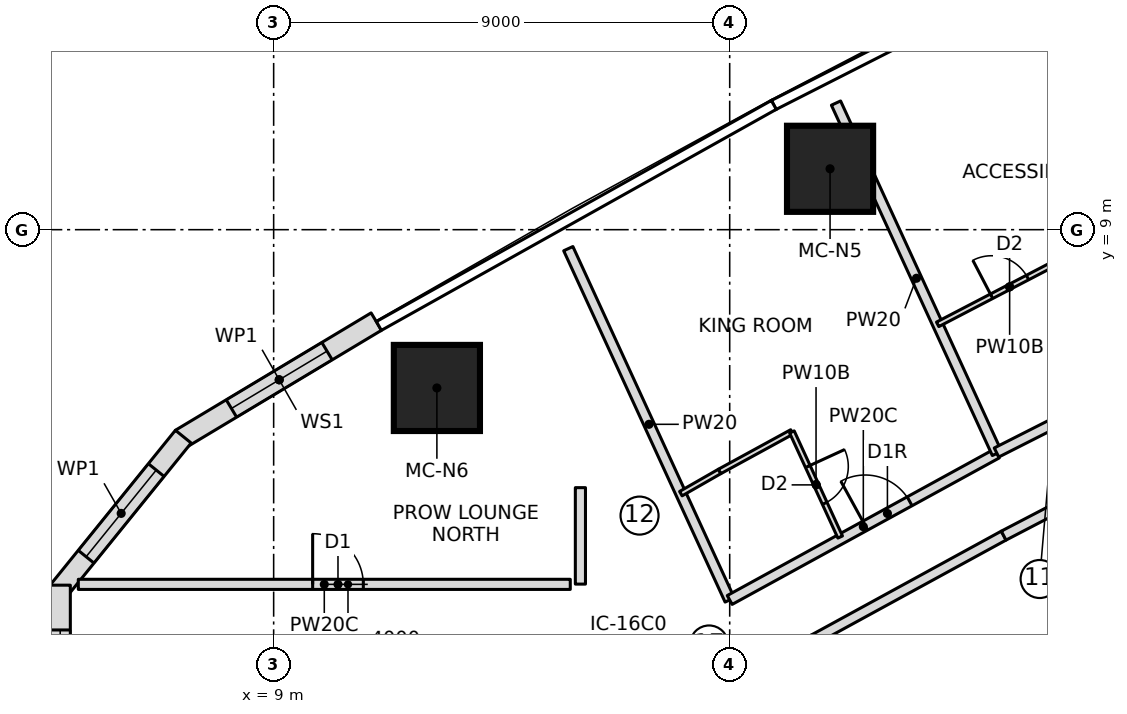
"""IFC4 building model, lengths in metres.
Left out: names, types, materials, properties, quantities, classifications, styles, units other than length and angle.
Written with IfcOpenShell. Run it as: python <this file> out.ifc"""

import sys

from ifc_helpers import new_model, si_unit, direction, frame, frame_2d, origin, origin_2d, place, context, subcontext, project, spatial, polyline, rectangle, outline, extrude, element, fill, save


model = new_model("IFC4")
c1 = context("Model", 3, precision=1e-05, world=origin(), true_north=direction((0.0, 1.0)))
c2 = subcontext(c1, "Body", "Model", "MODEL_VIEW")
j1 = project(units=[si_unit("LENGTHUNIT", "METRE"), si_unit("PLANEANGLEUNIT", "RADIAN")], contexts=[c1])
p1 = place(None, origin())
s1 = spatial("IfcSite", under=j1, at=p1, CompositionType="ELEMENT")
p2 = place(p1, origin())
s2 = spatial("IfcBuilding", under=s1, at=p2, CompositionType="ELEMENT")
p3 = place(p2, frame((0.0, 0.0, 109.75)))
s3 = spatial("IfcBuildingStorey", under=s2, at=p3, CompositionType="ELEMENT", Elevation=109.75)
for number, where, z_axis, x_axis in (
    (1, (19.981, 10.202, 0.0), (0.0, 0.0, 1.0), (1.0, 0.0, 0.0)),
    (2, (12.221, 5.876, 0.0), (0.0, 0.0, 1.0), (1.0, 0.0, 0.0)),
):
    element("IfcColumn", number, at=place(p3, frame(where, z_axis=z_axis, x_axis=x_axis)), inside=s3, PredefinedType="COLUMN", context=c2, shape_type="SweptSolid", body=[
        extrude(rectangle(XDim=1.7, YDim=1.7, at=origin_2d()), origin(), (0.0, 0.0, 1.0), 3.55),
    ])
p4 = place(p3, frame((11.026, 7.186, 0.0), z_axis=(0.0, 0.0, 1.0), x_axis=(-0.857550776474, -0.514399325202, 0.0)))
e3 = element("IfcWall", 3, at=p4, inside=s3, PredefinedType="NOTDEFINED", context=c2, shape_type="SweptSolid", body=[
    extrude(outline(polyline([(0.0, -0.2), (4.503, -0.2), (4.433, 0.2), (0.0, 0.2), (0.0, -0.2)])), origin(), (0.0, 0.0, 1.0), 3.25),
])
p5 = place(p4, frame((1.134, 0.0, 0.6)))
e4 = element("IfcOpeningElement", 4, at=p5, cuts=e3, PredefinedType="OPENING", context=c2, shape_type="SweptSolid", body=[
    extrude(outline(polyline([(0.0, 1.35), (0.084, 1.771), (0.322, 2.128), (0.679, 2.366), (1.1, 2.45), (1.521, 2.366), (1.878, 2.128), (2.116, 1.771), (2.2, 1.35), (2.2, 1.1), (2.116, 0.679), (1.878, 0.322), (1.521, 0.084), (1.1, 0.0), (0.679, 0.084), (0.322, 0.322), (0.084, 0.679), (0.0, 1.1), (0.0, 1.35)])), frame((0.0, 0.21, 0.0), z_axis=(0.0, -1.0, 0.0), x_axis=(1.0, 0.0, 0.0)), (0.0, 0.0, 1.0), 0.42),
])
p6 = place(p3, frame((7.194, 4.888, 0.0), z_axis=(0.0, 0.0, 1.0), x_axis=(-0.62903486133, -0.777377092042, 0.0)))
e5 = element("IfcWall", 5, at=p6, inside=s3, PredefinedType="NOTDEFINED", context=c2, shape_type="SweptSolid", body=[
    extrude(outline(polyline([(-0.035, -0.2), (3.897, -0.2), (3.756, 0.2), (0.035, 0.2), (-0.035, -0.2)])), origin(), (0.0, 0.0, 1.0), 3.25),
])
p7 = place(p6, frame((0.813, 0.0, 0.6)))
e6 = element("IfcOpeningElement", 6, at=p7, cuts=e5, PredefinedType="OPENING", context=c2, shape_type="SweptSolid", body=[
    extrude(outline(polyline([(0.0, 1.35), (0.084, 1.771), (0.322, 2.128), (0.679, 2.366), (1.1, 2.45), (1.521, 2.366), (1.878, 2.128), (2.116, 1.771), (2.2, 1.35), (2.2, 1.1), (2.116, 0.679), (1.878, 0.322), (1.521, 0.084), (1.1, 0.0), (0.679, 0.084), (0.322, 0.322), (0.084, 0.679), (0.0, 1.1), (0.0, 1.35)])), frame((0.0, 0.21, 0.0), z_axis=(0.0, -1.0, 0.0), x_axis=(1.0, 0.0, 0.0)), (0.0, 0.0, 1.0), 0.42),
])
p8 = place(p3, frame((4.787, 1.913, 0.0), z_axis=(0.0, 0.0, 1.0), x_axis=(0.0, -1.0, 0.0)))
e7 = element("IfcWall", 7, at=p8, inside=s3, PredefinedType="NOTDEFINED", context=c2, shape_type="SweptSolid", body=[
    extrude(outline(polyline([(-0.071, -0.2), (3.897, -0.2), (3.755, 0.2), (0.071, 0.2), (-0.071, -0.2)])), origin(), (0.0, 0.0, 1.0), 3.25),
])
p9 = place(p8, frame((0.813, 0.0, 0.6)))
e8 = element("IfcOpeningElement", 8, at=p9, cuts=e7, PredefinedType="OPENING", context=c2, shape_type="SweptSolid", body=[
    extrude(outline(polyline([(0.0, 1.35), (0.084, 1.771), (0.322, 2.128), (0.679, 2.366), (1.1, 2.45), (1.521, 2.366), (1.878, 2.128), (2.116, 1.771), (2.2, 1.35), (2.2, 1.1), (2.116, 0.679), (1.878, 0.322), (1.521, 0.084), (1.1, 0.0), (0.679, 0.084), (0.322, 0.322), (0.084, 0.679), (0.0, 1.1), (0.0, 1.35)])), frame((0.0, 0.21, 0.0), z_axis=(0.0, -1.0, 0.0), x_axis=(1.0, 0.0, 0.0)), (0.0, 0.0, 1.0), 0.42),
])
p10 = place(p3, frame((5.145, 2.0, 0.0), z_axis=(0.0, 0.0, 1.0), x_axis=(1.0, 0.0, 0.0)))
e9 = element("IfcWall", 9, at=p10, inside=s3, PredefinedType="PARTITIONING", context=c2, shape_type="SweptSolid", body=[
    extrude(rectangle(XDim=9.709, YDim=0.2, at=frame_2d((4.854, 0.0))), origin(), (0.0, 0.0, 1.0), 3.25),
])
p11 = place(p10, frame((4.625, 0.0, 0.0)))
e10 = element("IfcOpeningElement", 10, at=p11, cuts=e9, PredefinedType="OPENING", context=c2, shape_type="SweptSolid", body=[
    extrude(rectangle(XDim=1.0, YDim=2.1, at=frame_2d((0.5, 1.05))), frame((0.0, 0.11, 0.0), z_axis=(0.0, -1.0, 0.0), x_axis=(1.0, 0.0, 0.0)), (0.0, 0.0, 1.0), 0.22),
])
p12 = place(p3, frame((14.815, 8.626, 0.0), z_axis=(0.0, 0.0, 1.0), x_axis=(0.417432341259, -0.908708006166, 0.0)))
e11 = element("IfcWall", 11, at=p12, inside=s3, PredefinedType="PARTITIONING", context=c2, shape_type="SweptSolid", body=[
    extrude(rectangle(XDim=7.631, YDim=0.2, at=frame_2d((3.815, 0.0))), origin(), (0.0, 0.0, 1.0), 3.25),
])
p13 = place(p3, frame((18.0, 1.692, 0.0), z_axis=(0.0, 0.0, 1.0), x_axis=(0.876809096721, 0.480838650597, 0.0)))
e12 = element("IfcWall", 12, at=p13, inside=s3, PredefinedType="PARTITIONING", context=c2, shape_type="SweptSolid", body=[
    extrude(rectangle(XDim=6.015, YDim=0.2, at=frame_2d((3.008, 0.0))), origin(), (0.0, 0.0, 1.0), 3.25),
])
p14 = place(p13, frame((3.05, 0.0, 0.0)))
e13 = element("IfcOpeningElement", 13, at=p14, cuts=e12, PredefinedType="OPENING", context=c2, shape_type="SweptSolid", body=[
    extrude(rectangle(XDim=1.0, YDim=2.1, at=frame_2d((0.5, 1.05))), frame((0.0, 0.11, 0.0), z_axis=(0.0, -1.0, 0.0), x_axis=(1.0, 0.0, 0.0)), (0.0, 0.0, 1.0), 0.22),
])
p15 = place(p3, frame((17.036, 3.79, 0.0), z_axis=(0.0, 0.0, 1.0), x_axis=(0.867629162742, 0.497211862248, 0.0)))
e14 = element("IfcWall", 14, at=p15, inside=s3, PredefinedType="PARTITIONING", context=c2, shape_type="SweptSolid", body=[
    extrude(rectangle(XDim=0.882, YDim=0.1, at=frame_2d((0.441, 0.0))), origin(), (0.0, 0.0, 1.0), 3.25),
])
p16 = place(p3, frame((17.801, 4.229, 0.0), z_axis=(0.0, 0.0, 1.0), x_axis=(0.877424481957, 0.479714788663, 0.0)))
e15 = element("IfcWall", 15, at=p16, inside=s3, PredefinedType="PARTITIONING", context=c2, shape_type="SweptSolid", body=[
    extrude(rectangle(XDim=1.625, YDim=0.1, at=frame_2d((0.813, 0.0))), origin(), (0.0, 0.0, 1.0), 3.25),
])
p17 = place(p3, frame((19.228, 5.008, 0.0), z_axis=(0.0, 0.0, 1.0), x_axis=(0.417450047292, -0.908699872354, 0.0)))
e16 = element("IfcWall", 16, at=p17, inside=s3, PredefinedType="PARTITIONING", context=c2, shape_type="SweptSolid", body=[
    extrude(rectangle(XDim=2.283, YDim=0.1, at=frame_2d((1.141, 0.0))), origin(), (0.0, 0.0, 1.0), 3.25),
])
p18 = place(p17, frame((0.75, 0.0, 0.0)))
e17 = element("IfcOpeningElement", 17, at=p18, cuts=e16, PredefinedType="OPENING", context=c2, shape_type="SweptSolid", body=[
    extrude(rectangle(XDim=0.8, YDim=2.1, at=frame_2d((0.4, 1.05))), frame((0.0, 0.06, 0.0), z_axis=(0.0, -1.0, 0.0), x_axis=(1.0, 0.0, 0.0)), (0.0, 0.0, 1.0), 0.12),
])
p19 = place(p3, frame((23.274, 4.584, 0.0), z_axis=(0.0, 0.0, 1.0), x_axis=(-0.417440028355, 0.908704474913, 0.0)))
e18 = element("IfcWall", 18, at=p19, inside=s3, PredefinedType="PARTITIONING", context=c2, shape_type="SweptSolid", body=[
    extrude(rectangle(XDim=7.61, YDim=0.2, at=frame_2d((3.805, 0.0))), origin(), (0.0, 0.0, 1.0), 3.25),
])
p20 = place(p3, frame((23.266, 4.602, 0.0), z_axis=(0.0, 0.0, 1.0), x_axis=(0.892007141151, 0.452021304958, 0.0)))
e19 = element("IfcWall", 19, at=p20, inside=s3, PredefinedType="PARTITIONING", context=c2, shape_type="SweptSolid", body=[
    extrude(rectangle(XDim=6.004, YDim=0.2, at=frame_2d((3.002, 0.0))), origin(), (0.0, 0.0, 1.0), 3.25),
])
p21 = place(p20, frame((3.7, 0.0, 0.0)))
e20 = element("IfcOpeningElement", 20, at=p21, cuts=e19, PredefinedType="OPENING", context=c2, shape_type="SweptSolid", body=[
    extrude(rectangle(XDim=1.0, YDim=2.1, at=frame_2d((0.5, 1.05))), frame((0.0, 0.11, 0.0), z_axis=(0.0, -1.0, 0.0), x_axis=(1.0, 0.0, 0.0)), (0.0, 0.0, 1.0), 0.22),
])
p22 = place(p3, frame((22.104, 7.132, 0.0), z_axis=(0.0, 0.0, 1.0), x_axis=(0.886865947566, 0.46202682936, 0.0)))
e21 = element("IfcWall", 21, at=p22, inside=s3, PredefinedType="PARTITIONING", context=c2, shape_type="SweptSolid", body=[
    extrude(rectangle(XDim=3.204, YDim=0.1, at=frame_2d((1.602, 0.0))), origin(), (0.0, 0.0, 1.0), 3.25),
])
p23 = place(p22, frame((1.2, 0.0, 0.0)))
e22 = element("IfcOpeningElement", 22, at=p23, cuts=e21, PredefinedType="OPENING", context=c2, shape_type="SweptSolid", body=[
    extrude(rectangle(XDim=0.8, YDim=2.1, at=frame_2d((0.4, 1.05))), frame((0.0, 0.06, 0.0), z_axis=(0.0, -1.0, 0.0), x_axis=(1.0, 0.0, 0.0)), (0.0, 0.0, 1.0), 0.12),
])
p24 = place(p3, frame((19.657, 0.912, 0.0), z_axis=(0.0, 0.0, 1.0), x_axis=(0.877465075585, 0.479640533242, 0.0)))
e23 = element("IfcWall", 23, at=p24, inside=s3, PredefinedType="PARTITIONING", context=c2, shape_type="SweptSolid", body=[
    extrude(rectangle(XDim=4.273, YDim=0.2, at=frame_2d((2.137, 0.0))), origin(), (0.0, 0.0, 1.0), 3.25),
])
p25 = place(p3, frame((23.407, 2.962, 0.0), z_axis=(0.0, 0.0, 1.0), x_axis=(0.886891405098, 0.46197796004, 0.0)))
e24 = element("IfcWall", 24, at=p25, inside=s3, PredefinedType="PARTITIONING", context=c2, shape_type="SweptSolid", body=[
    extrude(rectangle(XDim=3.676, YDim=0.2, at=frame_2d((1.838, 0.0))), origin(), (0.0, 0.0, 1.0), 3.25),
])
p26 = place(p3, frame((15.054, 3.909, 0.0), z_axis=(0.0, 0.0, 1.0), x_axis=(0.0, -1.0, 0.0)))
e25 = element("IfcWall", 25, at=p26, inside=s3, PredefinedType="PARTITIONING", context=c2, shape_type="SweptSolid", body=[
    extrude(rectangle(XDim=1.904, YDim=0.2, at=frame_2d((0.952, 0.0))), origin(), (0.0, 0.0, 1.0), 3.25),
])
p27 = place(p5, origin())
e26 = element("IfcWindow", 26, at=p27, inside=s3, PartitioningType="SINGLE_PANEL", PredefinedType="WINDOW", context=c2, shape_type="SweptSolid", body=[
    extrude(outline(polyline([(0.0, 1.35), (0.084, 1.771), (0.322, 2.128), (0.679, 2.366), (1.1, 2.45), (1.521, 2.366), (1.878, 2.128), (2.116, 1.771), (2.2, 1.35), (2.2, 1.1), (2.116, 0.679), (1.878, 0.322), (1.521, 0.084), (1.1, 0.0), (0.679, 0.084), (0.322, 0.322), (0.084, 0.679), (0.0, 1.1), (0.0, 1.35)])), frame((0.0, 0.17, 0.0), z_axis=(0.0, -1.0, 0.0), x_axis=(1.0, 0.0, 0.0)), (0.0, 0.0, 1.0), 0.06),
])
fill(e4, e26)
p28 = place(p7, origin())
e27 = element("IfcWindow", 27, at=p28, inside=s3, PartitioningType="SINGLE_PANEL", PredefinedType="WINDOW", context=c2, shape_type="SweptSolid", body=[
    extrude(outline(polyline([(0.0, 1.35), (0.084, 1.771), (0.322, 2.128), (0.679, 2.366), (1.1, 2.45), (1.521, 2.366), (1.878, 2.128), (2.116, 1.771), (2.2, 1.35), (2.2, 1.1), (2.116, 0.679), (1.878, 0.322), (1.521, 0.084), (1.1, 0.0), (0.679, 0.084), (0.322, 0.322), (0.084, 0.679), (0.0, 1.1), (0.0, 1.35)])), frame((0.0, 0.17, 0.0), z_axis=(0.0, -1.0, 0.0), x_axis=(1.0, 0.0, 0.0)), (0.0, 0.0, 1.0), 0.06),
])
fill(e6, e27)
p29 = place(p9, origin())
e28 = element("IfcWindow", 28, at=p29, inside=s3, PartitioningType="SINGLE_PANEL", PredefinedType="WINDOW", context=c2, shape_type="SweptSolid", body=[
    extrude(outline(polyline([(0.0, 1.35), (0.084, 1.771), (0.322, 2.128), (0.679, 2.366), (1.1, 2.45), (1.521, 2.366), (1.878, 2.128), (2.116, 1.771), (2.2, 1.35), (2.2, 1.1), (2.116, 0.679), (1.878, 0.322), (1.521, 0.084), (1.1, 0.0), (0.679, 0.084), (0.322, 0.322), (0.084, 0.679), (0.0, 1.1), (0.0, 1.35)])), frame((0.0, 0.17, 0.0), z_axis=(0.0, -1.0, 0.0), x_axis=(1.0, 0.0, 0.0)), (0.0, 0.0, 1.0), 0.06),
])
fill(e8, e28)
p30 = place(p11, origin())
e29 = element("IfcDoor", 29, at=p30, inside=s3, OperationType="SINGLE_SWING_LEFT", PredefinedType="DOOR", context=c2, shape_type="SweptSolid", body=[
    extrude(rectangle(XDim=1.0, YDim=2.1, at=frame_2d((0.5, 1.05))), frame((0.0, 0.025, 0.0), z_axis=(0.0, -1.0, 0.0), x_axis=(1.0, 0.0, 0.0)), (0.0, 0.0, 1.0), 0.05),
])
fill(e10, e29)
p31 = place(p18, origin())
e30 = element("IfcDoor", 30, at=p31, inside=s3, OperationType="SINGLE_SWING_LEFT", PredefinedType="DOOR", context=c2, shape_type="SweptSolid", body=[
    extrude(rectangle(XDim=0.8, YDim=2.1, at=frame_2d((0.4, 1.05))), frame((0.0, 0.025, 0.0), z_axis=(0.0, -1.0, 0.0), x_axis=(1.0, 0.0, 0.0)), (0.0, 0.0, 1.0), 0.05),
])
fill(e17, e30)
p32 = place(p14, origin())
e31 = element("IfcDoor", 31, at=p32, inside=s3, OperationType="SINGLE_SWING_RIGHT", PredefinedType="DOOR", context=c2, shape_type="SweptSolid", body=[
    extrude(rectangle(XDim=1.0, YDim=2.1, at=frame_2d((0.5, 1.05))), frame((0.0, 0.025, 0.0), z_axis=(0.0, -1.0, 0.0), x_axis=(1.0, 0.0, 0.0)), (0.0, 0.0, 1.0), 0.05),
])
fill(e13, e31)
p33 = place(p23, origin())
e32 = element("IfcDoor", 32, at=p33, inside=s3, OperationType="SINGLE_SWING_LEFT", PredefinedType="DOOR", context=c2, shape_type="SweptSolid", body=[
    extrude(rectangle(XDim=0.8, YDim=2.1, at=frame_2d((0.4, 1.05))), frame((0.0, 0.025, 0.0), z_axis=(0.0, -1.0, 0.0), x_axis=(1.0, 0.0, 0.0)), (0.0, 0.0, 1.0), 0.05),
])
fill(e22, e32)
save(model, sys.argv[1])
